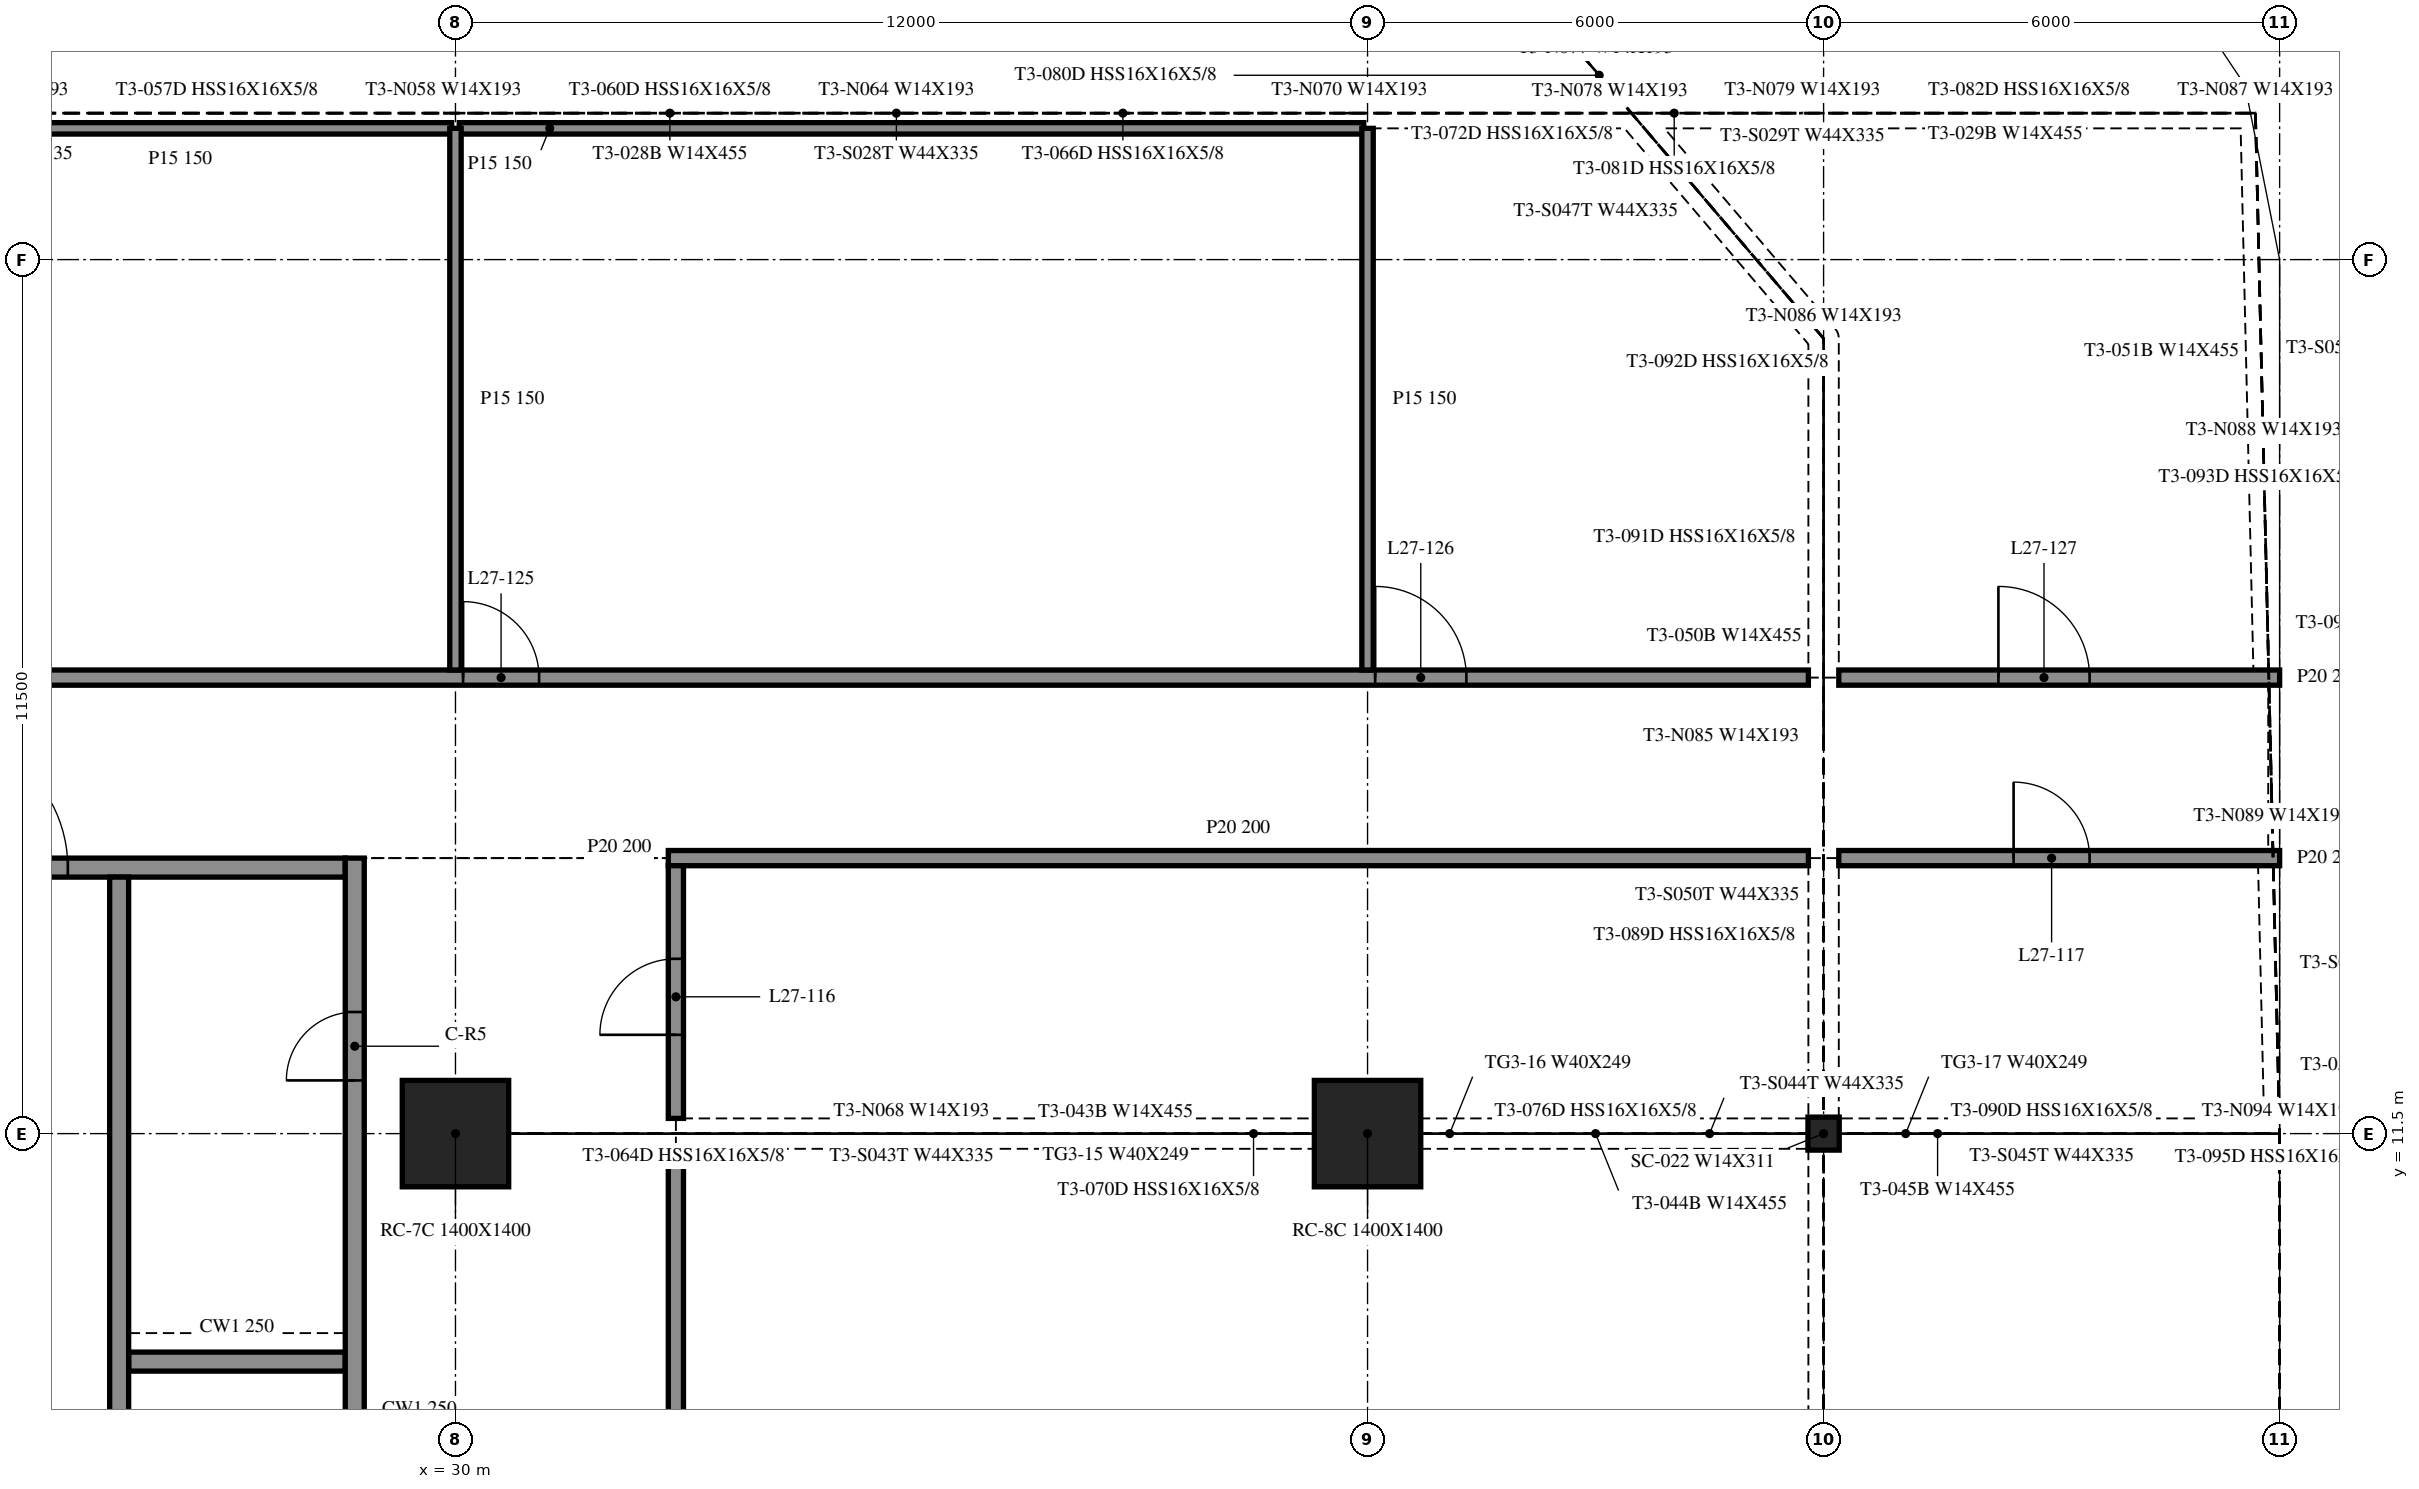
"""IFC4 building model, lengths in metres.
Left out: names, types, materials, properties, quantities, classifications, styles, units other than length and angle.
Written with IfcOpenShell. Run it as: python <this file> out.ifc"""

import sys

from ifc_helpers import new_model, si_unit, direction, frame, frame_2d, origin, origin_2d, place, context, subcontext, project, spatial, rectangle, i_section, extrude, element, fill, save


model = new_model("IFC4")
c1 = context("Model", 3, precision=1e-05, world=origin(), true_north=direction((0.0, 1.0)))
c2 = subcontext(c1, "Body", "Model", "MODEL_VIEW")
j1 = project(units=[si_unit("LENGTHUNIT", "METRE"), si_unit("PLANEANGLEUNIT", "RADIAN")], contexts=[c1])
p1 = place(None, origin())
s1 = spatial("IfcSite", under=j1, at=p1, CompositionType="ELEMENT")
p2 = place(p1, origin())
s2 = spatial("IfcBuilding", under=s1, at=p2, CompositionType="ELEMENT")
p3 = place(p2, frame((0.0, 0.0, 117.6)))
s3 = spatial("IfcBuildingStorey", under=s2, at=p3, CompositionType="ELEMENT", Elevation=117.6)
for number, where, z_axis, x_axis in (
    (1, (30.0, 11.5, -0.55), (0.0, 0.0, 1.0), (1.0, 0.0, 0.0)),
    (2, (42.0, 11.5, -0.55), (0.0, 0.0, 1.0), (1.0, 0.0, 0.0)),
):
    element("IfcColumn", number, at=place(p3, frame(where, z_axis=z_axis, x_axis=x_axis)), inside=s3, PredefinedType="COLUMN", context=c2, shape_type="SweptSolid", body=[
        extrude(rectangle(XDim=1.4, YDim=1.4, at=origin_2d()), origin(), (0.0, 0.0, 1.0), 4.61),
    ])
p4 = place(p3, frame((48.0, 11.5, -0.55), z_axis=(0.0, 0.0, 1.0), x_axis=(1.0, 0.0, 0.0)))
e3 = element("IfcColumn", 3, at=p4, inside=s3, PredefinedType="COLUMN", context=c2, shape_type="SweptSolid", body=[
    extrude(i_section(OverallWidth=0.412, OverallDepth=0.434, WebThickness=0.036, FlangeThickness=0.057, at=origin_2d()), origin(), (0.0, 0.0, 1.0), 4.61),
])
p5 = place(p3, frame((28.675, -9.125, 0.0), z_axis=(0.0, 0.0, 1.0), x_axis=(0.0, 1.0, 0.0)))
e4 = element("IfcWall", 4, at=p5, inside=s3, PredefinedType="SOLIDWALL", context=c2, shape_type="SweptSolid", body=[
    extrude(rectangle(XDim=24.25, YDim=0.25, at=frame_2d((12.125, 0.0))), origin(), (0.0, 0.0, 1.0), 4.06),
])
p6 = place(p5, frame((14.425, 0.0, 0.0)))
e5 = element("IfcOpeningElement", 5, at=p6, cuts=e4, PredefinedType="OPENING", context=c2, shape_type="SweptSolid", body=[
    extrude(rectangle(XDim=0.9, YDim=2.1, at=frame_2d((0.45, 1.05))), frame((0.0, 0.135, 0.0), z_axis=(0.0, -1.0, 0.0), x_axis=(1.0, 0.0, 0.0)), (0.0, 0.0, 1.0), 0.27),
])
p7 = place(p5, frame((21.325, 0.0, 0.0)))
e6 = element("IfcOpeningElement", 6, at=p7, cuts=e4, PredefinedType="OPENING", context=c2, shape_type="SweptSolid", body=[
    extrude(rectangle(XDim=0.9, YDim=2.1, at=frame_2d((0.45, 1.05))), frame((0.0, 0.135, 0.0), z_axis=(0.0, -1.0, 0.0), x_axis=(1.0, 0.0, 0.0)), (0.0, 0.0, 1.0), 0.27),
])
p8 = place(p3, frame((19.45, 15.0, 0.0), z_axis=(0.0, 0.0, 1.0), x_axis=(1.0, 0.0, 0.0)))
e7 = element("IfcWall", 7, at=p8, inside=s3, PredefinedType="SOLIDWALL", context=c2, shape_type="SweptSolid", body=[
    extrude(rectangle(XDim=9.1, YDim=0.25, at=frame_2d((4.55, 0.0))), origin(), (0.0, 0.0, 1.0), 4.06),
])
p9 = place(p8, frame((3.65, 0.0, 0.0)))
e8 = element("IfcOpeningElement", 8, at=p9, cuts=e7, PredefinedType="OPENING", context=c2, shape_type="SweptSolid", body=[
    extrude(rectangle(XDim=1.8, YDim=2.1, at=frame_2d((0.9, 1.05))), frame((0.0, 0.135, 0.0), z_axis=(0.0, -1.0, 0.0), x_axis=(1.0, 0.0, 0.0)), (0.0, 0.0, 1.0), 0.27),
])
p10 = place(p3, frame((25.575, 14.875, 0.0), z_axis=(0.0, 0.0, 1.0), x_axis=(0.0, -1.0, 0.0)))
e9 = element("IfcWall", 9, at=p10, inside=s3, PredefinedType="SOLIDWALL", context=c2, shape_type="SweptSolid", body=[
    extrude(rectangle(XDim=17.5, YDim=0.25, at=frame_2d((8.75, 0.0))), origin(), (0.0, 0.0, 1.0), 4.06),
])
p11 = place(p10, frame((15.45, 0.0, 0.0)))
e10 = element("IfcOpeningElement", 10, at=p11, cuts=e9, PredefinedType="OPENING", context=c2, shape_type="SweptSolid", body=[
    extrude(rectangle(XDim=1.1, YDim=2.1, at=frame_2d((0.55, 1.05))), frame((0.0, 0.135, 0.0), z_axis=(0.0, -1.0, 0.0), x_axis=(1.0, 0.0, 0.0)), (0.0, 0.0, 1.0), 0.27),
])
p12 = place(p10, frame((12.8, 0.0, 0.0)))
e11 = element("IfcOpeningElement", 11, at=p12, cuts=e9, PredefinedType="OPENING", context=c2, shape_type="SweptSolid", body=[
    extrude(rectangle(XDim=0.9, YDim=2.1, at=frame_2d((0.45, 1.05))), frame((0.0, 0.135, 0.0), z_axis=(0.0, -1.0, 0.0), x_axis=(1.0, 0.0, 0.0)), (0.0, 0.0, 1.0), 0.27),
])
p13 = place(p3, frame((25.7, 8.5, 0.0), z_axis=(0.0, 0.0, 1.0), x_axis=(1.0, 0.0, 0.0)))
e12 = element("IfcWall", 12, at=p13, inside=s3, PredefinedType="SOLIDWALL", context=c2, shape_type="SweptSolid", body=[
    extrude(rectangle(XDim=2.85, YDim=0.25, at=frame_2d((1.425, 0.0))), origin(), (0.0, 0.0, 1.0), 4.06),
])
p14 = place(p3, frame((32.8, 15.125, 0.0), z_axis=(0.0, 0.0, 1.0), x_axis=(1.0, 0.0, 0.0)))
e13 = element("IfcWall", 13, at=p14, inside=s3, PredefinedType="PARTITIONING", context=c2, shape_type="SweptSolid", body=[
    extrude(rectangle(XDim=15.0, YDim=0.2, at=frame_2d((7.5, 0.0))), origin(), (0.0, 0.0, 1.0), 4.06),
])
p15 = place(p3, frame((48.2, 15.125, 0.0), z_axis=(0.0, 0.0, 1.0), x_axis=(1.0, 0.0, 0.0)))
e14 = element("IfcWall", 14, at=p15, inside=s3, PredefinedType="PARTITIONING", context=c2, shape_type="SweptSolid", body=[
    extrude(rectangle(XDim=5.8, YDim=0.2, at=frame_2d((2.9, 0.0))), origin(), (0.0, 0.0, 1.0), 4.06),
])
p16 = place(p15, frame((2.3, 0.0, 0.0)))
e15 = element("IfcOpeningElement", 15, at=p16, cuts=e14, PredefinedType="OPENING", context=c2, shape_type="SweptSolid", body=[
    extrude(rectangle(XDim=1.0, YDim=2.1, at=frame_2d((0.5, 1.05))), frame((0.0, 0.11, 0.0), z_axis=(0.0, -1.0, 0.0), x_axis=(1.0, 0.0, 0.0)), (0.0, 0.0, 1.0), 0.22),
])
p17 = place(p3, frame((-48.0, 17.5, 0.0), z_axis=(0.0, 0.0, 1.0), x_axis=(1.0, 0.0, 0.0)))
e16 = element("IfcWall", 16, at=p17, inside=s3, PredefinedType="PARTITIONING", context=c2, shape_type="SweptSolid", body=[
    extrude(rectangle(XDim=95.8, YDim=0.2, at=frame_2d((47.9, 0.0))), origin(), (0.0, 0.0, 1.0), 4.06),
])
p18 = place(p17, frame((4.3, 0.0, 0.0)))
e17 = element("IfcOpeningElement", 17, at=p18, cuts=e16, PredefinedType="OPENING", context=c2, shape_type="SweptSolid", body=[
    extrude(rectangle(XDim=1.2, YDim=2.1, at=frame_2d((0.6, 1.05))), frame((0.0, 0.11, 0.0), z_axis=(0.0, -1.0, 0.0), x_axis=(1.0, 0.0, 0.0)), (0.0, 0.0, 1.0), 0.22),
])
p19 = place(p17, frame((16.5, 0.0, 0.0)))
e18 = element("IfcOpeningElement", 18, at=p19, cuts=e16, PredefinedType="OPENING", context=c2, shape_type="SweptSolid", body=[
    extrude(rectangle(XDim=1.0, YDim=2.1, at=frame_2d((0.5, 1.05))), frame((0.0, 0.11, 0.0), z_axis=(0.0, -1.0, 0.0), x_axis=(1.0, 0.0, 0.0)), (0.0, 0.0, 1.0), 0.22),
])
p20 = place(p17, frame((28.3, 0.0, 0.0)))
e19 = element("IfcOpeningElement", 19, at=p20, cuts=e16, PredefinedType="OPENING", context=c2, shape_type="SweptSolid", body=[
    extrude(rectangle(XDim=1.2, YDim=2.1, at=frame_2d((0.6, 1.05))), frame((0.0, 0.11, 0.0), z_axis=(0.0, -1.0, 0.0), x_axis=(1.0, 0.0, 0.0)), (0.0, 0.0, 1.0), 0.22),
])
p21 = place(p17, frame((40.3, 0.0, 0.0)))
e20 = element("IfcOpeningElement", 20, at=p21, cuts=e16, PredefinedType="OPENING", context=c2, shape_type="SweptSolid", body=[
    extrude(rectangle(XDim=1.2, YDim=2.1, at=frame_2d((0.6, 1.05))), frame((0.0, 0.11, 0.0), z_axis=(0.0, -1.0, 0.0), x_axis=(1.0, 0.0, 0.0)), (0.0, 0.0, 1.0), 0.22),
])
p22 = place(p17, frame((47.3, 0.0, 0.0)))
e21 = element("IfcOpeningElement", 21, at=p22, cuts=e16, PredefinedType="OPENING", context=c2, shape_type="SweptSolid", body=[
    extrude(rectangle(XDim=1.0, YDim=2.1, at=frame_2d((0.5, 1.05))), frame((0.0, 0.11, 0.0), z_axis=(0.0, -1.0, 0.0), x_axis=(1.0, 0.0, 0.0)), (0.0, 0.0, 1.0), 0.22),
])
p23 = place(p17, frame((54.1, 0.0, 0.0)))
e22 = element("IfcOpeningElement", 22, at=p23, cuts=e16, PredefinedType="OPENING", context=c2, shape_type="SweptSolid", body=[
    extrude(rectangle(XDim=1.0, YDim=2.1, at=frame_2d((0.5, 1.05))), frame((0.0, 0.11, 0.0), z_axis=(0.0, -1.0, 0.0), x_axis=(1.0, 0.0, 0.0)), (0.0, 0.0, 1.0), 0.22),
])
p24 = place(p17, frame((66.1, 0.0, 0.0)))
e23 = element("IfcOpeningElement", 23, at=p24, cuts=e16, PredefinedType="OPENING", context=c2, shape_type="SweptSolid", body=[
    extrude(rectangle(XDim=1.2, YDim=2.1, at=frame_2d((0.6, 1.05))), frame((0.0, 0.11, 0.0), z_axis=(0.0, -1.0, 0.0), x_axis=(1.0, 0.0, 0.0)), (0.0, 0.0, 1.0), 0.22),
])
p25 = place(p17, frame((78.1, 0.0, 0.0)))
e24 = element("IfcOpeningElement", 24, at=p25, cuts=e16, PredefinedType="OPENING", context=c2, shape_type="SweptSolid", body=[
    extrude(rectangle(XDim=1.0, YDim=2.1, at=frame_2d((0.5, 1.05))), frame((0.0, 0.11, 0.0), z_axis=(0.0, -1.0, 0.0), x_axis=(1.0, 0.0, 0.0)), (0.0, 0.0, 1.0), 0.22),
])
p26 = place(p17, frame((90.1, 0.0, 0.0)))
e25 = element("IfcOpeningElement", 25, at=p26, cuts=e16, PredefinedType="OPENING", context=c2, shape_type="SweptSolid", body=[
    extrude(rectangle(XDim=1.2, YDim=2.1, at=frame_2d((0.6, 1.05))), frame((0.0, 0.11, 0.0), z_axis=(0.0, -1.0, 0.0), x_axis=(1.0, 0.0, 0.0)), (0.0, 0.0, 1.0), 0.22),
])
p27 = place(p3, frame((48.2, 17.5, 0.0), z_axis=(0.0, 0.0, 1.0), x_axis=(1.0, 0.0, 0.0)))
e26 = element("IfcWall", 26, at=p27, inside=s3, PredefinedType="PARTITIONING", context=c2, shape_type="SweptSolid", body=[
    extrude(rectangle(XDim=5.8, YDim=0.2, at=frame_2d((2.9, 0.0))), origin(), (0.0, 0.0, 1.0), 4.06),
])
p28 = place(p27, frame((2.1, 0.0, 0.0)))
e27 = element("IfcOpeningElement", 27, at=p28, cuts=e26, PredefinedType="OPENING", context=c2, shape_type="SweptSolid", body=[
    extrude(rectangle(XDim=1.2, YDim=2.1, at=frame_2d((0.6, 1.05))), frame((0.0, 0.11, 0.0), z_axis=(0.0, -1.0, 0.0), x_axis=(1.0, 0.0, 0.0)), (0.0, 0.0, 1.0), 0.22),
])
for number, where, z_axis, x_axis in (
    (28, (18.05, 24.727, 0.0), (0.0, 0.0, 1.0), (1.0, 0.0, 0.0)),
    (29, (30.05, 24.727, 0.0), (0.0, 0.0, 1.0), (1.0, 0.0, 0.0)),
):
    element("IfcWall", number, at=place(p3, frame(where, z_axis=z_axis, x_axis=x_axis)), inside=s3, PredefinedType="PARTITIONING", context=c2, shape_type="SweptSolid", body=[
        extrude(rectangle(XDim=11.9, YDim=0.15, at=frame_2d((5.95, 0.0))), origin(), (0.0, 0.0, 1.0), 4.06),
    ])
p29 = place(p3, frame((30.0, 17.6, 0.0), z_axis=(0.0, 0.0, 1.0), x_axis=(0.0, 1.0, 0.0)))
e30 = element("IfcWall", 30, at=p29, inside=s3, PredefinedType="PARTITIONING", context=c2, shape_type="SweptSolid", body=[
    extrude(rectangle(XDim=7.127, YDim=0.15, at=frame_2d((3.563, 0.0))), origin(), (0.0, 0.0, 1.0), 4.06),
])
p30 = place(p3, frame((32.9, 0.2, 0.0), z_axis=(0.0, 0.0, 1.0), x_axis=(0.0, 1.0, 0.0)))
e31 = element("IfcWall", 31, at=p30, inside=s3, PredefinedType="PARTITIONING", context=c2, shape_type="SweptSolid", body=[
    extrude(rectangle(XDim=11.1, YDim=0.2, at=frame_2d((5.55, 0.0))), origin(), (0.0, 0.0, 1.0), 4.06),
])
p31 = place(p30, frame((5.1, 0.0, 0.0)))
e32 = element("IfcOpeningElement", 32, at=p31, cuts=e31, PredefinedType="OPENING", context=c2, shape_type="SweptSolid", body=[
    extrude(rectangle(XDim=1.0, YDim=2.1, at=frame_2d((0.5, 1.05))), frame((0.0, 0.11, 0.0), z_axis=(0.0, -1.0, 0.0), x_axis=(1.0, 0.0, 0.0)), (0.0, 0.0, 1.0), 0.22),
])
p32 = place(p3, frame((32.9, 11.7, 0.0), z_axis=(0.0, 0.0, 1.0), x_axis=(0.0, 1.0, 0.0)))
e33 = element("IfcWall", 33, at=p32, inside=s3, PredefinedType="PARTITIONING", context=c2, shape_type="SweptSolid", body=[
    extrude(rectangle(XDim=3.325, YDim=0.2, at=frame_2d((1.663, 0.0))), origin(), (0.0, 0.0, 1.0), 4.06),
])
p33 = place(p32, frame((1.1, 0.0, 0.0)))
e34 = element("IfcOpeningElement", 34, at=p33, cuts=e33, PredefinedType="OPENING", context=c2, shape_type="SweptSolid", body=[
    extrude(rectangle(XDim=1.0, YDim=2.1, at=frame_2d((0.5, 1.05))), frame((0.0, 0.11, 0.0), z_axis=(0.0, -1.0, 0.0), x_axis=(1.0, 0.0, 0.0)), (0.0, 0.0, 1.0), 0.22),
])
p34 = place(p3, frame((42.0, 17.6, 0.0), z_axis=(0.0, 0.0, 1.0), x_axis=(0.0, 1.0, 0.0)))
e35 = element("IfcWall", 35, at=p34, inside=s3, PredefinedType="PARTITIONING", context=c2, shape_type="SweptSolid", body=[
    extrude(rectangle(XDim=7.127, YDim=0.15, at=frame_2d((3.563, 0.0))), origin(), (0.0, 0.0, 1.0), 4.06),
])
p35 = place(p9, origin())
e36 = element("IfcDoor", 36, at=p35, inside=s3, OperationType="DOUBLE_DOOR_SINGLE_SWING", PredefinedType="DOOR", context=c2, shape_type="SweptSolid", body=[
    extrude(rectangle(XDim=1.8, YDim=2.1, at=frame_2d((0.9, 1.05))), frame((0.0, 0.025, 0.0), z_axis=(0.0, -1.0, 0.0), x_axis=(1.0, 0.0, 0.0)), (0.0, 0.0, 1.0), 0.05),
])
fill(e8, e36)
p36 = place(p7, origin())
e37 = element("IfcDoor", 37, at=p36, inside=s3, OperationType="SINGLE_SWING_LEFT", PredefinedType="DOOR", context=c2, shape_type="SweptSolid", body=[
    extrude(rectangle(XDim=0.9, YDim=2.1, at=frame_2d((0.45, 1.05))), frame((0.0, 0.025, 0.0), z_axis=(0.0, -1.0, 0.0), x_axis=(1.0, 0.0, 0.0)), (0.0, 0.0, 1.0), 0.05),
])
fill(e6, e37)
p37 = place(p33, origin())
e38 = element("IfcDoor", 38, at=p37, inside=s3, OperationType="SINGLE_SWING_RIGHT", PredefinedType="DOOR", context=c2, shape_type="SweptSolid", body=[
    extrude(rectangle(XDim=1.0, YDim=2.1, at=frame_2d((0.5, 1.05))), frame((0.0, 0.025, 0.0), z_axis=(0.0, -1.0, 0.0), x_axis=(1.0, 0.0, 0.0)), (0.0, 0.0, 1.0), 0.05),
])
fill(e34, e38)
p38 = place(p16, origin())
e39 = element("IfcDoor", 39, at=p38, inside=s3, OperationType="SINGLE_SWING_LEFT", PredefinedType="DOOR", context=c2, shape_type="SweptSolid", body=[
    extrude(rectangle(XDim=1.0, YDim=2.1, at=frame_2d((0.5, 1.05))), frame((0.0, 0.025, 0.0), z_axis=(0.0, -1.0, 0.0), x_axis=(1.0, 0.0, 0.0)), (0.0, 0.0, 1.0), 0.05),
])
fill(e15, e39)
p39 = place(p25, origin())
e40 = element("IfcDoor", 40, at=p39, inside=s3, OperationType="SINGLE_SWING_RIGHT", PredefinedType="DOOR", context=c2, shape_type="SweptSolid", body=[
    extrude(rectangle(XDim=1.0, YDim=2.1, at=frame_2d((0.5, 1.05))), frame((0.0, 0.025, 0.0), z_axis=(0.0, -1.0, 0.0), x_axis=(1.0, 0.0, 0.0)), (0.0, 0.0, 1.0), 0.05),
])
fill(e24, e40)
p40 = place(p26, origin())
e41 = element("IfcDoor", 41, at=p40, inside=s3, OperationType="SINGLE_SWING_RIGHT", PredefinedType="DOOR", context=c2, shape_type="SweptSolid", body=[
    extrude(rectangle(XDim=1.2, YDim=2.1, at=frame_2d((0.6, 1.05))), frame((0.0, 0.025, 0.0), z_axis=(0.0, -1.0, 0.0), x_axis=(1.0, 0.0, 0.0)), (0.0, 0.0, 1.0), 0.05),
])
fill(e25, e41)
p41 = place(p28, origin())
e42 = element("IfcDoor", 42, at=p41, inside=s3, OperationType="SINGLE_SWING_LEFT", PredefinedType="DOOR", context=c2, shape_type="SweptSolid", body=[
    extrude(rectangle(XDim=1.2, YDim=2.1, at=frame_2d((0.6, 1.05))), frame((0.0, 0.025, 0.0), z_axis=(0.0, -1.0, 0.0), x_axis=(1.0, 0.0, 0.0)), (0.0, 0.0, 1.0), 0.05),
])
fill(e27, e42)
save(model, sys.argv[1])
